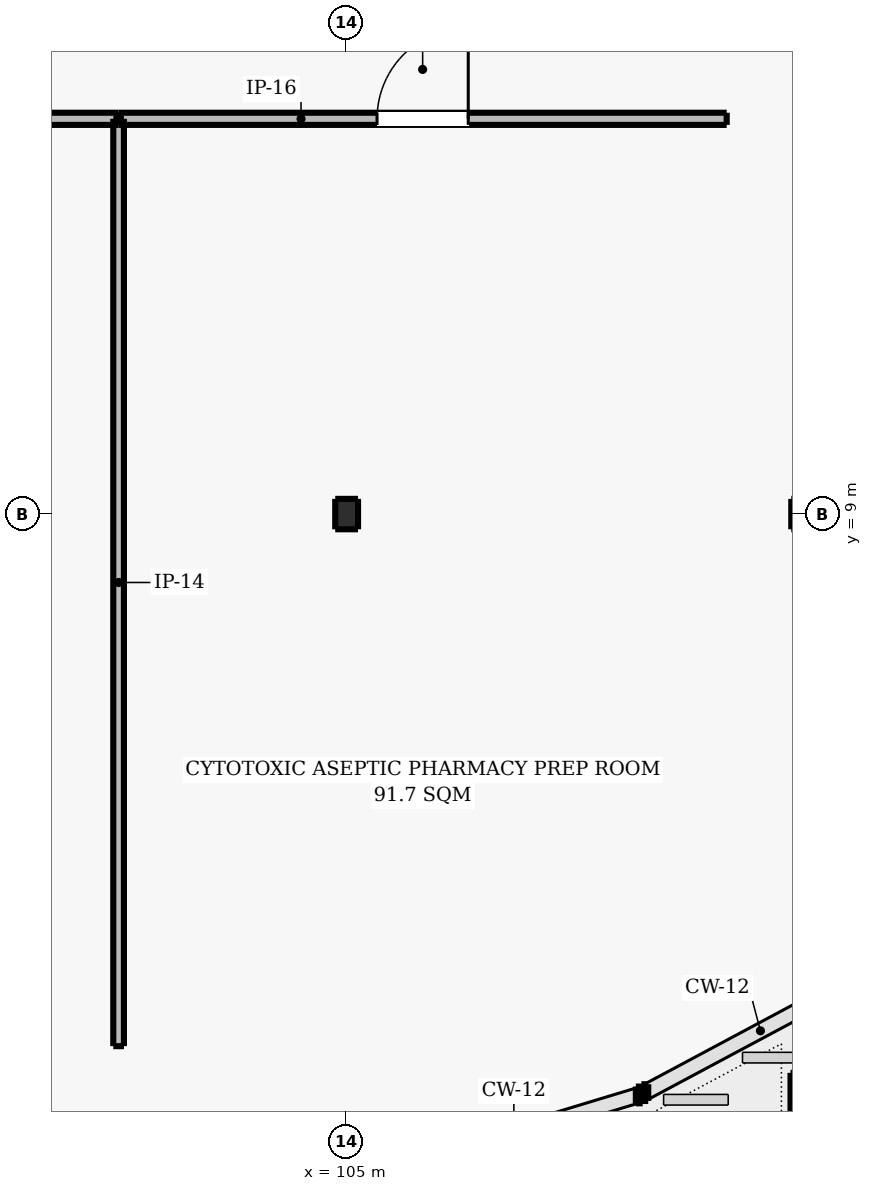
"""IFC4 building model, lengths in metres.
Left out: names, types, materials, properties, quantities, classifications, styles, units other than length and angle.
Written with IfcOpenShell. Run it as: python <this file> out.ifc"""

import sys

from ifc_helpers import new_model, si_unit, direction, frame, frame_2d, origin, origin_2d, place, context, subcontext, project, spatial, rectangle, i_section, extrude, element, fill, save


model = new_model("IFC4")
c1 = context("Model", 3, precision=1e-05, world=origin(), true_north=direction((0.0, 1.0)))
c2 = subcontext(c1, "Body", "Model", "MODEL_VIEW")
j1 = project(units=[si_unit("LENGTHUNIT", "METRE"), si_unit("PLANEANGLEUNIT", "RADIAN")], contexts=[c1])
p1 = place(None, origin())
s1 = spatial("IfcSite", under=j1, at=p1, CompositionType="ELEMENT")
p2 = place(p1, origin())
s2 = spatial("IfcBuilding", under=s1, at=p2, CompositionType="ELEMENT")
p3 = place(p2, frame((0.0, 0.0, 9.6)))
s3 = spatial("IfcBuildingStorey", under=s2, at=p3, CompositionType="ELEMENT", Elevation=9.6)
for number, where, z_axis, x_axis in (
    (1, (105.0, 9.0, 0.0), (0.0, 0.0, 1.0), (1.0, 0.0, 0.0)),
    (2, (111.0, 9.0, 0.0), (0.0, 0.0, 1.0), (1.0, 0.0, 0.0)),
):
    element("IfcColumn", number, at=place(p3, frame(where, z_axis=z_axis, x_axis=x_axis)), inside=s3, PredefinedType="COLUMN", context=c2, shape_type="SweptSolid", body=[
        extrude(i_section(OverallWidth=0.3, OverallDepth=0.4, WebThickness=0.013, FlangeThickness=0.024, FilletRadius=0.027, at=origin_2d()), origin(), (0.0, 0.0, 1.0), 4.2),
    ])
p4 = place(p3, frame((110.92, 1.649, 0.0), z_axis=(0.0, 0.0, 1.0), x_axis=(0.0, -1.0, 0.0)))
e3 = element("IfcWall", 3, at=p4, inside=s3, PredefinedType="PARAPET", context=c2, shape_type="SweptSolid", body=[
    extrude(rectangle(XDim=1.649, YDim=0.16, at=frame_2d((0.824, 0.0))), origin(), (0.0, 0.0, 1.0), 0.85),
])
p5 = place(p3, frame((90.9, 14.2, 0.0), z_axis=(0.0, 0.0, 1.0), x_axis=(1.0, 0.0, 0.0)))
e4 = element("IfcWall", 4, at=p5, inside=s3, PredefinedType="PARTITIONING", context=c2, shape_type="SweptSolid", body=[
    extrude(rectangle(XDim=11.1, YDim=0.16, at=frame_2d((5.55, 0.0))), origin(), (0.0, 0.0, 1.0), 3.93),
])
p6 = place(p5, frame((4.85, 0.0, 0.0)))
e5 = element("IfcOpeningElement", 5, at=p6, cuts=e4, PredefinedType="OPENING", context=c2, shape_type="SweptSolid", body=[
    extrude(rectangle(XDim=1.4, YDim=2.2, at=frame_2d((0.7, 1.1))), frame((0.0, 0.09, 0.0), z_axis=(0.0, -1.0, 0.0), x_axis=(1.0, 0.0, 0.0)), (0.0, 0.0, 1.0), 0.18),
])
p7 = place(p3, frame((102.0, 2.0, 0.0), z_axis=(0.0, 0.0, 1.0), x_axis=(0.0, 1.0, 0.0)))
e6 = element("IfcWall", 6, at=p7, inside=s3, PredefinedType="PARTITIONING", context=c2, shape_type="SweptSolid", body=[
    extrude(rectangle(XDim=12.2, YDim=0.14, at=frame_2d((6.1, 0.0))), origin(), (0.0, 0.0, 1.0), 3.93),
])
p8 = place(p3, frame((102.0, 14.2, 0.0), z_axis=(0.0, 0.0, 1.0), x_axis=(1.0, 0.0, 0.0)))
e7 = element("IfcWall", 7, at=p8, inside=s3, PredefinedType="PARTITIONING", context=c2, shape_type="SweptSolid", body=[
    extrude(rectangle(XDim=8.0, YDim=0.16, at=frame_2d((4.0, 0.0))), origin(), (0.0, 0.0, 1.0), 3.93),
])
p9 = place(p8, frame((3.4, 0.0, 0.0)))
e8 = element("IfcOpeningElement", 8, at=p9, cuts=e7, PredefinedType="OPENING", context=c2, shape_type="SweptSolid", body=[
    extrude(rectangle(XDim=1.2, YDim=2.2, at=frame_2d((0.6, 1.1))), frame((0.0, 0.09, 0.0), z_axis=(0.0, -1.0, 0.0), x_axis=(1.0, 0.0, 0.0)), (0.0, 0.0, 1.0), 0.18),
])
p10 = place(p9, origin())
e9 = element("IfcDoor", 9, at=p10, inside=s3, OperationType="SINGLE_SWING_RIGHT", PredefinedType="DOOR", context=c2, shape_type="SweptSolid", body=[
    extrude(rectangle(XDim=1.2, YDim=2.2, at=frame_2d((0.6, 1.1))), frame((0.0, 0.025, 0.0), z_axis=(0.0, -1.0, 0.0), x_axis=(1.0, 0.0, 0.0)), (0.0, 0.0, 1.0), 0.05),
])
fill(e8, e9)
save(model, sys.argv[1])
